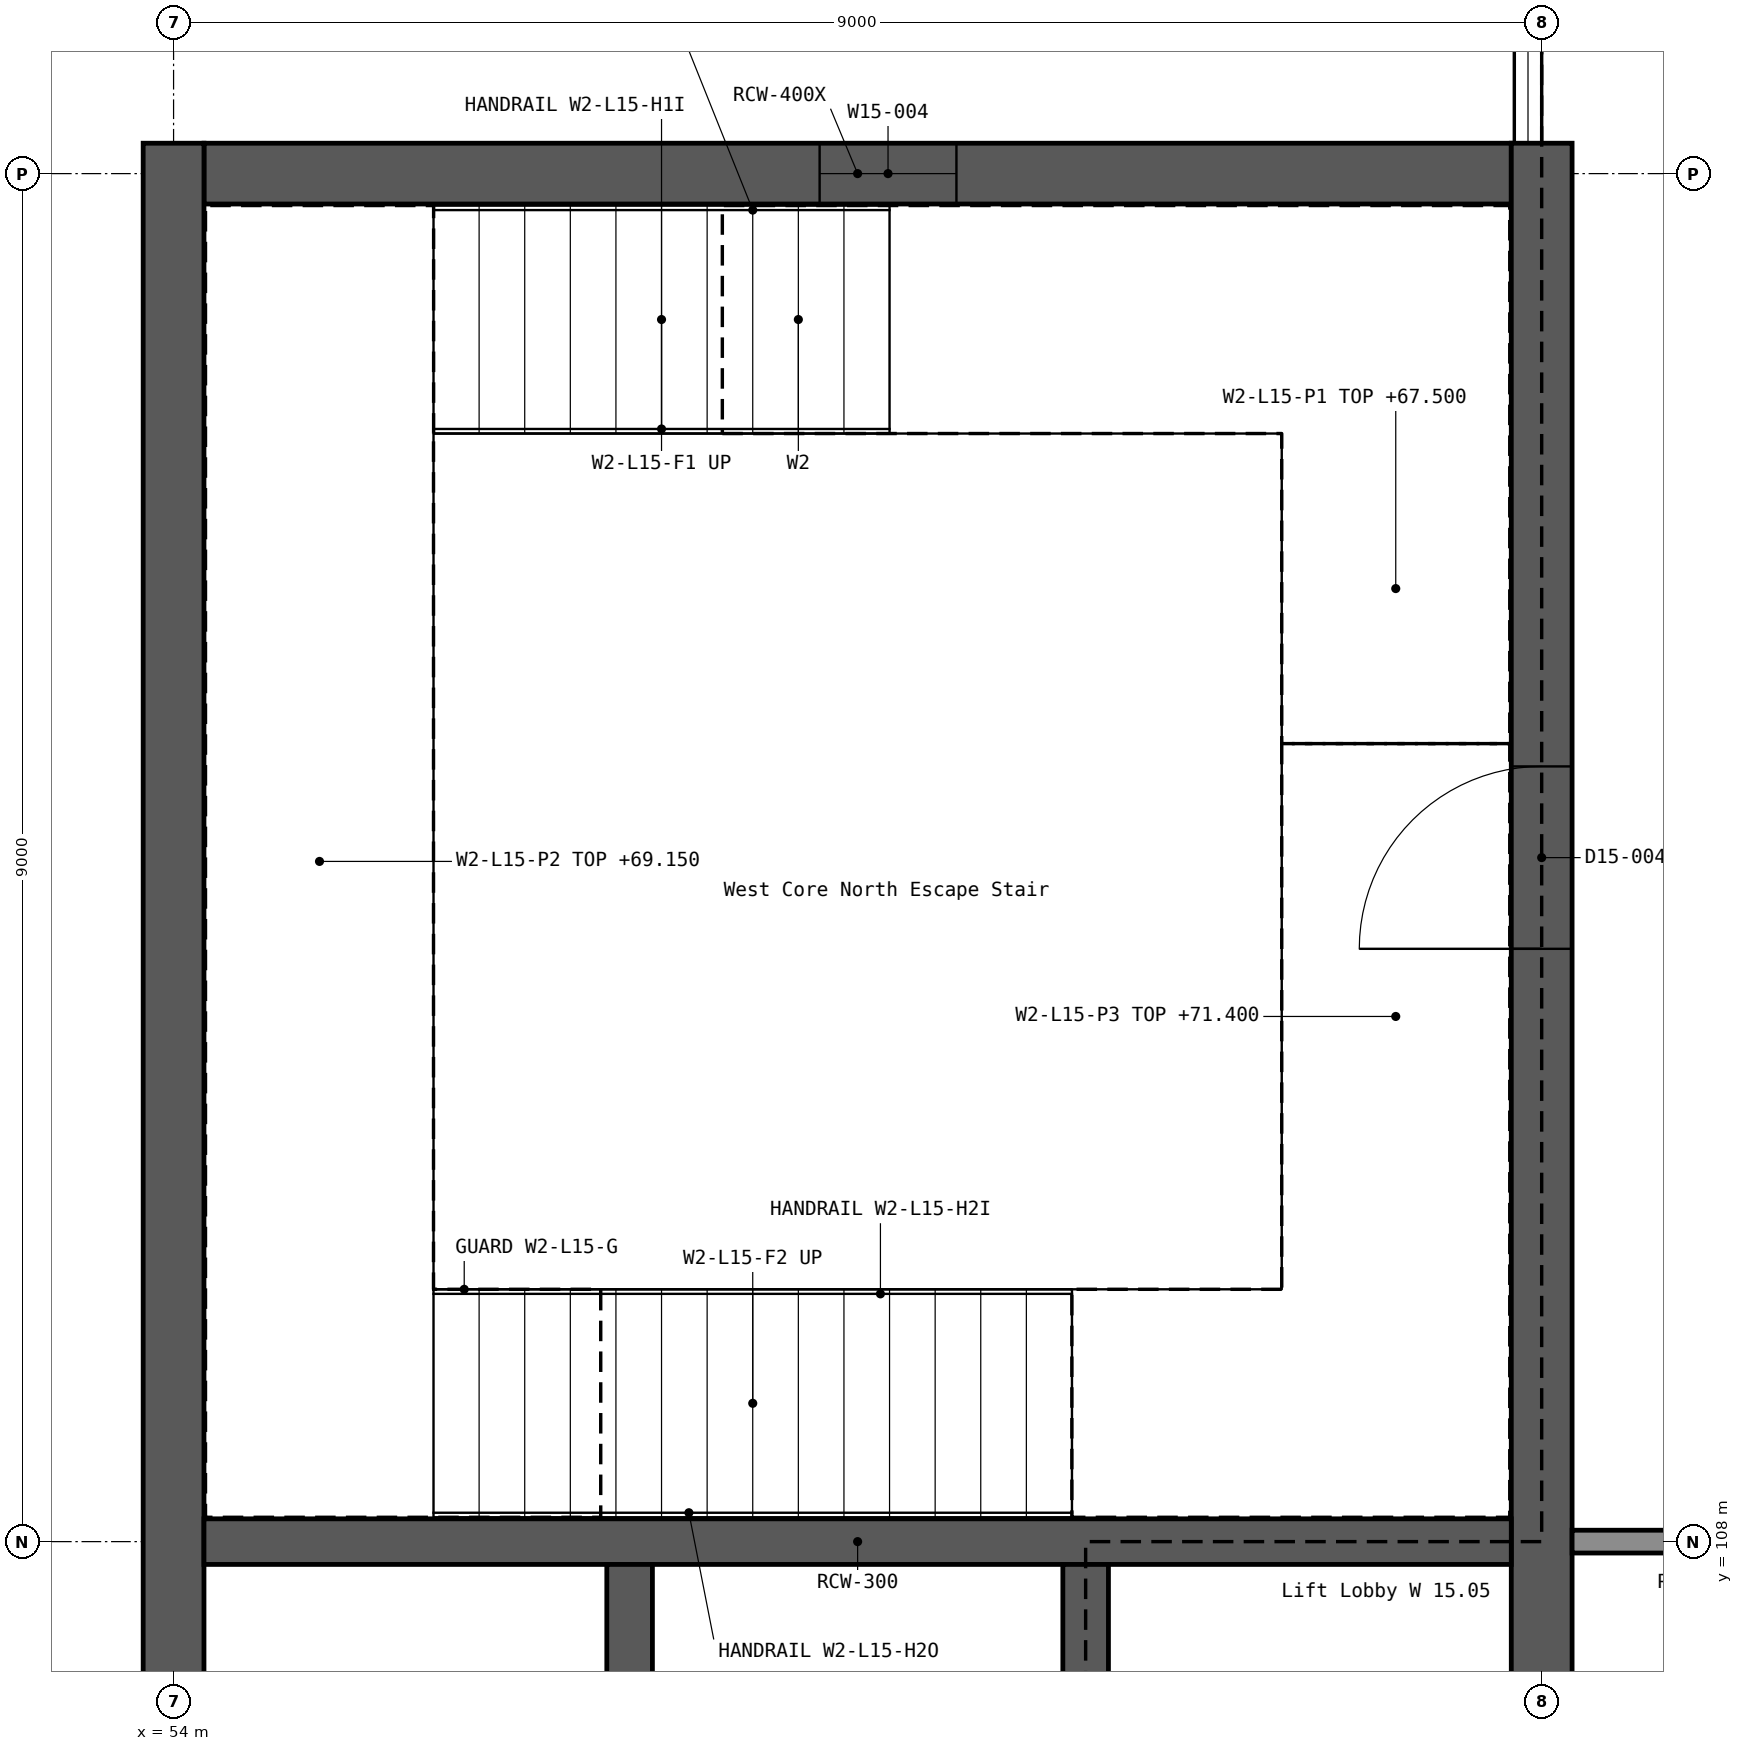
"""IFC4 building model, lengths in metres.
Left out: names, types, materials, properties, quantities, classifications, styles, units other than length and angle.
Written with IfcOpenShell. Run it as: python <this file> out.ifc"""

import sys

from ifc_helpers import new_model, si_unit, direction, frame, frame_2d, origin, place, context, subcontext, project, spatial, rectangle, extrude, element, fill, save


model = new_model("IFC4")
c1 = context("Model", 3, precision=1e-05, world=origin(), true_north=direction((0.0, 1.0)))
c2 = subcontext(c1, "Body", "Model", "MODEL_VIEW")
j1 = project(units=[si_unit("LENGTHUNIT", "METRE"), si_unit("PLANEANGLEUNIT", "RADIAN")], contexts=[c1])
p1 = place(None, origin())
s1 = spatial("IfcSite", under=j1, at=p1, CompositionType="ELEMENT")
p2 = place(p1, origin())
s2 = spatial("IfcBuilding", under=s1, at=p2, CompositionType="ELEMENT")
p3 = place(p2, frame((0.0, 0.0, 67.5)))
s3 = spatial("IfcBuildingStorey", under=s2, at=p3, CompositionType="ELEMENT", Elevation=67.5)
p4 = place(p3, frame((54.2, 117.0, 0.0), z_axis=(0.0, 0.0, 1.0), x_axis=(1.0, 0.0, 0.0)))
e1 = element("IfcWall", 1, at=p4, inside=s3, PredefinedType="SHEAR", context=c2, shape_type="SweptSolid", body=[
    extrude(rectangle(XDim=8.6, YDim=0.4, at=frame_2d((4.3, 0.0))), origin(), (0.0, 0.0, 1.0), 3.9),
])
p5 = place(p4, frame((4.05, 0.0, 1.2)))
e2 = element("IfcOpeningElement", 2, at=p5, cuts=e1, PredefinedType="OPENING", context=c2, shape_type="SweptSolid", body=[
    extrude(rectangle(XDim=0.9, YDim=1.5, at=frame_2d((0.45, 0.75))), frame((0.0, 0.211, 0.0), z_axis=(0.0, -1.0, 0.0), x_axis=(1.0, 0.0, 0.0)), (0.0, 0.0, 1.0), 0.422),
])
p6 = place(p3, frame((54.0, 89.8, 0.0), z_axis=(0.0, 0.0, 1.0), x_axis=(0.0, 1.0, 0.0)))
e3 = element("IfcWall", 3, at=p6, inside=s3, PredefinedType="SHEAR", context=c2, shape_type="SweptSolid", body=[
    extrude(rectangle(XDim=27.4, YDim=0.4, at=frame_2d((13.7, 0.0))), origin(), (0.0, 0.0, 1.0), 3.9),
])
p7 = place(p3, frame((63.0, 89.8, 0.0), z_axis=(0.0, 0.0, 1.0), x_axis=(0.0, 1.0, 0.0)))
e4 = element("IfcWall", 4, at=p7, inside=s3, PredefinedType="SHEAR", context=c2, shape_type="SweptSolid", body=[
    extrude(rectangle(XDim=27.4, YDim=0.4, at=frame_2d((13.7, 0.0))), origin(), (0.0, 0.0, 1.0), 3.9),
])
p8 = place(p7, frame((4.1, 0.0, 0.0)))
e5 = element("IfcOpeningElement", 5, at=p8, cuts=e4, PredefinedType="OPENING", context=c2, shape_type="SweptSolid", body=[
    extrude(rectangle(XDim=1.2, YDim=2.1, at=frame_2d((0.6, 1.05))), frame((0.0, 0.211, 0.0), z_axis=(0.0, -1.0, 0.0), x_axis=(1.0, 0.0, 0.0)), (0.0, 0.0, 1.0), 0.422),
])
p9 = place(p7, frame((22.1, 0.0, 0.0)))
e6 = element("IfcOpeningElement", 6, at=p9, cuts=e4, PredefinedType="OPENING", context=c2, shape_type="SweptSolid", body=[
    extrude(rectangle(XDim=1.2, YDim=2.1, at=frame_2d((0.6, 1.05))), frame((0.0, 0.211, 0.0), z_axis=(0.0, -1.0, 0.0), x_axis=(1.0, 0.0, 0.0)), (0.0, 0.0, 1.0), 0.422),
])
p10 = place(p7, frame((12.5, 0.0, 0.0)))
e7 = element("IfcOpeningElement", 7, at=p10, cuts=e4, PredefinedType="OPENING", context=c2, shape_type="SweptSolid", body=[
    extrude(rectangle(XDim=2.0, YDim=2.1, at=frame_2d((1.0, 1.05))), frame((0.0, 0.211, 0.0), z_axis=(0.0, -1.0, 0.0), x_axis=(1.0, 0.0, 0.0)), (0.0, 0.0, 1.0), 0.422),
])
p11 = place(p3, frame((54.2, 108.0, 0.0), z_axis=(0.0, 0.0, 1.0), x_axis=(1.0, 0.0, 0.0)))
e8 = element("IfcWall", 8, at=p11, inside=s3, PredefinedType="SHEAR", context=c2, shape_type="SweptSolid", body=[
    extrude(rectangle(XDim=8.6, YDim=0.3, at=frame_2d((4.3, 0.0))), origin(), (0.0, 0.0, 1.0), 3.9),
])
p12 = place(p3, frame((57.0, 99.15, 0.0), z_axis=(0.0, 0.0, 1.0), x_axis=(0.0, 1.0, 0.0)))
e9 = element("IfcWall", 9, at=p12, inside=s3, PredefinedType="SHEAR", context=c2, shape_type="SweptSolid", body=[
    extrude(rectangle(XDim=8.7, YDim=0.3, at=frame_2d((4.35, 0.0))), origin(), (0.0, 0.0, 1.0), 3.9),
])
p13 = place(p3, frame((60.0, 99.15, 0.0), z_axis=(0.0, 0.0, 1.0), x_axis=(0.0, 1.0, 0.0)))
e10 = element("IfcWall", 10, at=p13, inside=s3, PredefinedType="SHEAR", context=c2, shape_type="SweptSolid", body=[
    extrude(rectangle(XDim=8.7, YDim=0.3, at=frame_2d((4.35, 0.0))), origin(), (0.0, 0.0, 1.0), 3.9),
])
p14 = place(p13, frame((0.8, 0.0, 0.0)))
e11 = element("IfcOpeningElement", 11, at=p14, cuts=e10, PredefinedType="OPENING", context=c2, shape_type="SweptSolid", body=[
    extrude(rectangle(XDim=1.1, YDim=2.1, at=frame_2d((0.55, 1.05))), frame((0.0, 0.161, 0.0), z_axis=(0.0, -1.0, 0.0), x_axis=(1.0, 0.0, 0.0)), (0.0, 0.0, 1.0), 0.322),
])
p15 = place(p13, frame((3.8, 0.0, 0.0)))
e12 = element("IfcOpeningElement", 12, at=p15, cuts=e10, PredefinedType="OPENING", context=c2, shape_type="SweptSolid", body=[
    extrude(rectangle(XDim=1.1, YDim=2.1, at=frame_2d((0.55, 1.05))), frame((0.0, 0.161, 0.0), z_axis=(0.0, -1.0, 0.0), x_axis=(1.0, 0.0, 0.0)), (0.0, 0.0, 1.0), 0.322),
])
p16 = place(p13, frame((6.8, 0.0, 0.0)))
e13 = element("IfcOpeningElement", 13, at=p16, cuts=e10, PredefinedType="OPENING", context=c2, shape_type="SweptSolid", body=[
    extrude(rectangle(XDim=1.1, YDim=2.1, at=frame_2d((0.55, 1.05))), frame((0.0, 0.161, 0.0), z_axis=(0.0, -1.0, 0.0), x_axis=(1.0, 0.0, 0.0)), (0.0, 0.0, 1.0), 0.322),
])
p17 = place(p3, frame((63.2, 108.0, 0.0), z_axis=(0.0, 0.0, 1.0), x_axis=(1.0, 0.0, 0.0)))
e14 = element("IfcWall", 14, at=p17, inside=s3, PredefinedType="PARTITIONING", context=c2, shape_type="SweptSolid", body=[
    extrude(rectangle(XDim=2.8, YDim=0.15, at=frame_2d((1.4, 0.0))), origin(), (0.0, 0.0, 1.0), 3.27),
])
p18 = place(p17, frame((0.7, 0.0, 0.0)))
e15 = element("IfcOpeningElement", 15, at=p18, cuts=e14, PredefinedType="OPENING", context=c2, shape_type="SweptSolid", body=[
    extrude(rectangle(XDim=1.2, YDim=2.1, at=frame_2d((0.6, 1.05))), frame((0.0, 0.086, 0.0), z_axis=(0.0, -1.0, 0.0), x_axis=(1.0, 0.0, 0.0)), (0.0, 0.0, 1.0), 0.172),
])
p19 = place(p5, origin())
e16 = element("IfcWindow", 16, at=p19, inside=s3, PartitioningType="SINGLE_PANEL", PredefinedType="WINDOW", context=c2, shape_type="SweptSolid", body=[
    extrude(rectangle(XDim=0.9, YDim=1.5, at=frame_2d((0.45, 0.75))), frame((0.0, 0.03, 0.0), z_axis=(0.0, -1.0, 0.0), x_axis=(1.0, 0.0, 0.0)), (0.0, 0.0, 1.0), 0.06),
])
fill(e2, e16)
p20 = place(p9, origin())
e17 = element("IfcDoor", 17, at=p20, inside=s3, OperationType="SINGLE_SWING_LEFT", PredefinedType="DOOR", context=c2, shape_type="SweptSolid", body=[
    extrude(rectangle(XDim=1.2, YDim=2.1, at=frame_2d((0.6, 1.05))), frame((0.0, 0.025, 0.0), z_axis=(0.0, -1.0, 0.0), x_axis=(1.0, 0.0, 0.0)), (0.0, 0.0, 1.0), 0.05),
])
fill(e6, e17)
save(model, sys.argv[1])
